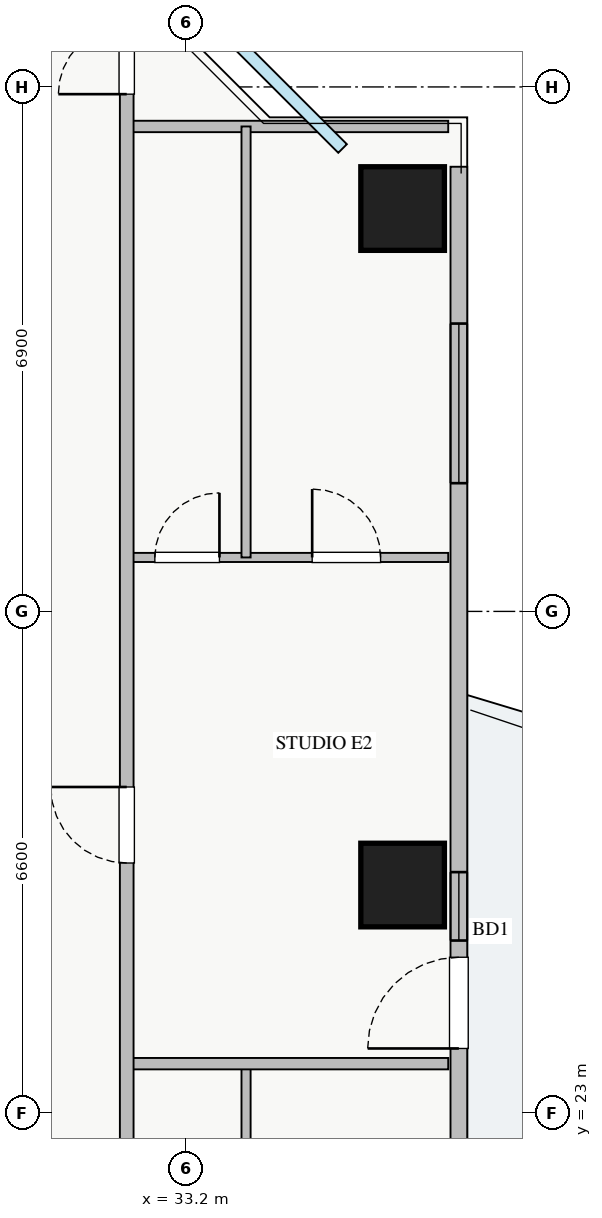
"""IFC4 building model, lengths in metres.
Left out: names, types, materials, properties, quantities, classifications, styles, units other than length and angle.
Written with IfcOpenShell. Run it as: python <this file> out.ifc"""

import sys

from ifc_helpers import new_model, si_unit, direction, frame, frame_2d, origin, origin_2d, place, context, subcontext, project, spatial, rectangle, extrude, source, transform, mapped, element, fill, save


model = new_model("IFC4")
c1 = context("Model", 3, precision=1e-05, world=origin(), true_north=direction((0.0, 1.0)))
c2 = subcontext(c1, "Body", "Model", "MODEL_VIEW")
j1 = project(units=[si_unit("LENGTHUNIT", "METRE"), si_unit("PLANEANGLEUNIT", "RADIAN")], contexts=[c1])
p1 = place(None, origin())
s1 = spatial("IfcSite", under=j1, at=p1, CompositionType="ELEMENT")
p2 = place(p1, origin())
s2 = spatial("IfcBuilding", under=s1, at=p2, CompositionType="ELEMENT")
p3 = place(p2, frame((0.0, 0.0, 116.5)))
s3 = spatial("IfcBuildingStorey", under=s2, at=p3, CompositionType="ELEMENT", Elevation=116.5)
m1 = source(origin(), c2, "Body", "SweptSolid", [
    extrude(rectangle(XDim=1.1, YDim=1.1, at=origin_2d()), origin(), (0.0, 0.0, 1.0), 3.25),
])
for number, where, z_axis, x_axis in (
    (1, (36.05, 26.0, 0.0), (0.0, 0.0, 1.0), (1.0, 0.0, 0.0)),
    (2, (36.05, 34.9, 0.0), (0.0, 0.0, 1.0), (1.0, 0.0, 0.0)),
):
    element("IfcColumn", number, at=place(p3, frame(where, z_axis=z_axis, x_axis=x_axis)), inside=s3, PredefinedType="COLUMN", context=c2, shape_type="MappedRepresentation", body=[
        mapped(m1, transform((0.0, 0.0, 0.0), x_axis=(1.0, 0.0, 0.0), y_axis=(0.0, 1.0, 0.0), z_axis=(0.0, 0.0, 1.0), scale=1.0)),
    ])
p4 = place(p3, frame((36.79, 10.55, 0.0), z_axis=(0.0, 0.0, 1.0), x_axis=(0.0, 1.0, 0.0)))
e3 = element("IfcWall", 3, at=p4, inside=s3, PredefinedType="STANDARD", context=c2, shape_type="SweptSolid", body=[
    extrude(rectangle(XDim=24.9, YDim=0.22, at=frame_2d((12.45, 0.0))), origin(), (0.0, 0.0, 1.0), 2.61),
])
p5 = place(p4, frame((13.3, 0.0, 0.0)))
e4 = element("IfcOpeningElement", 4, at=p5, cuts=e3, PredefinedType="OPENING", context=c2, shape_type="SweptSolid", body=[
    extrude(rectangle(XDim=1.2, YDim=2.1, at=frame_2d((0.6, 1.05))), frame((0.0, 0.12, 0.0), z_axis=(0.0, -1.0, 0.0), x_axis=(1.0, 0.0, 0.0)), (0.0, 0.0, 1.0), 0.24),
])
p6 = place(p4, frame((1.912, 0.0, 0.9)))
e5 = element("IfcOpeningElement", 5, at=p6, cuts=e3, PredefinedType="OPENING", context=c2, shape_type="SweptSolid", body=[
    extrude(rectangle(XDim=2.4, YDim=1.48, at=frame_2d((1.2, 0.74))), frame((0.0, 0.12, 0.0), z_axis=(0.0, -1.0, 0.0), x_axis=(1.0, 0.0, 0.0)), (0.0, 0.0, 1.0), 0.24),
])
p7 = place(p4, frame((20.737, 0.0, 0.9)))
e6 = element("IfcOpeningElement", 6, at=p7, cuts=e3, PredefinedType="OPENING", context=c2, shape_type="SweptSolid", body=[
    extrude(rectangle(XDim=2.1, YDim=1.48, at=frame_2d((1.05, 0.74))), frame((0.0, 0.12, 0.0), z_axis=(0.0, -1.0, 0.0), x_axis=(1.0, 0.0, 0.0)), (0.0, 0.0, 1.0), 0.24),
])
p8 = place(p4, frame((14.72, 0.0, 0.9)))
e7 = element("IfcOpeningElement", 7, at=p8, cuts=e3, PredefinedType="OPENING", context=c2, shape_type="SweptSolid", body=[
    extrude(rectangle(XDim=0.9, YDim=1.2, at=frame_2d((0.45, 0.6))), frame((0.0, 0.12, 0.0), z_axis=(0.0, -1.0, 0.0), x_axis=(1.0, 0.0, 0.0)), (0.0, 0.0, 1.0), 0.24),
])
p9 = place(p3, frame((32.42, 35.98, 0.0), z_axis=(0.0, 0.0, 1.0), x_axis=(1.0, 0.0, 0.0)))
e8 = element("IfcWall", 8, at=p9, inside=s3, PredefinedType="PARTITIONING", context=c2, shape_type="SweptSolid", body=[
    extrude(rectangle(XDim=4.23, YDim=0.15, at=frame_2d((2.115, 0.0))), origin(), (0.0, 0.0, 1.0), 3.07),
])
p10 = place(p3, frame((33.99, 17.38, 0.0), z_axis=(0.0, 0.0, 1.0), x_axis=(0.0, 1.0, 0.0)))
e9 = element("IfcWall", 9, at=p10, inside=s3, PredefinedType="PLUMBINGWALL", context=c2, shape_type="SweptSolid", body=[
    extrude(rectangle(XDim=6.27, YDim=0.12, at=frame_2d((3.135, 0.0))), origin(), (0.0, 0.0, 1.0), 3.07),
])
p11 = place(p3, frame((32.42, 30.31, 0.0), z_axis=(0.0, 0.0, 1.0), x_axis=(1.0, 0.0, 0.0)))
e10 = element("IfcWall", 10, at=p11, inside=s3, PredefinedType="PLUMBINGWALL", context=c2, shape_type="SweptSolid", body=[
    extrude(rectangle(XDim=4.23, YDim=0.12, at=frame_2d((2.115, 0.0))), origin(), (0.0, 0.0, 1.0), 3.07),
])
p12 = place(p11, frame((0.37, 0.0, 0.0)))
e11 = element("IfcOpeningElement", 11, at=p12, cuts=e10, PredefinedType="OPENING", context=c2, shape_type="SweptSolid", body=[
    extrude(rectangle(XDim=0.85, YDim=2.05, at=frame_2d((0.425, 1.025))), frame((0.0, 0.07, 0.0), z_axis=(0.0, -1.0, 0.0), x_axis=(1.0, 0.0, 0.0)), (0.0, 0.0, 1.0), 0.14),
])
p13 = place(p11, frame((2.44, 0.0, 0.0)))
e12 = element("IfcOpeningElement", 12, at=p13, cuts=e10, PredefinedType="OPENING", context=c2, shape_type="SweptSolid", body=[
    extrude(rectangle(XDim=0.9, YDim=2.05, at=frame_2d((0.45, 1.025))), frame((0.0, 0.07, 0.0), z_axis=(0.0, -1.0, 0.0), x_axis=(1.0, 0.0, 0.0)), (0.0, 0.0, 1.0), 0.14),
])
p14 = place(p3, frame((33.99, 30.31, 0.0), z_axis=(0.0, 0.0, 1.0), x_axis=(0.0, 1.0, 0.0)))
e13 = element("IfcWall", 13, at=p14, inside=s3, PredefinedType="PLUMBINGWALL", context=c2, shape_type="SweptSolid", body=[
    extrude(rectangle(XDim=5.67, YDim=0.12, at=frame_2d((2.835, 0.0))), origin(), (0.0, 0.0, 1.0), 3.07),
])
p15 = place(p3, frame((32.42, 23.65, 0.0), z_axis=(0.0, 0.0, 1.0), x_axis=(1.0, 0.0, 0.0)))
e14 = element("IfcWall", 14, at=p15, inside=s3, PredefinedType="PARTITIONING", context=c2, shape_type="SweptSolid", body=[
    extrude(rectangle(XDim=4.23, YDim=0.15, at=frame_2d((2.115, 0.0))), origin(), (0.0, 0.0, 1.0), 3.07),
])
p16 = place(p3, frame((32.42, 8.25, 0.0), z_axis=(0.0, 0.0, 1.0), x_axis=(0.0, 1.0, 0.0)))
e15 = element("IfcWall", 15, at=p16, inside=s3, PredefinedType="PARTITIONING", context=c2, shape_type="SweptSolid", body=[
    extrude(rectangle(XDim=29.5, YDim=0.18, at=frame_2d((14.75, 0.0))), origin(), (0.0, 0.0, 1.0), 3.07),
])
p17 = place(p16, frame((28.155, 0.0, 0.0)))
e16 = element("IfcOpeningElement", 16, at=p17, cuts=e15, PredefinedType="OPENING", context=c2, shape_type="SweptSolid", body=[
    extrude(rectangle(XDim=0.9, YDim=2.05, at=frame_2d((0.45, 1.025))), frame((0.0, 0.1, 0.0), z_axis=(0.0, -1.0, 0.0), x_axis=(1.0, 0.0, 0.0)), (0.0, 0.0, 1.0), 0.2),
])
p18 = place(p16, frame((0.445, 0.0, 0.0)))
e17 = element("IfcOpeningElement", 17, at=p18, cuts=e15, PredefinedType="OPENING", context=c2, shape_type="SweptSolid", body=[
    extrude(rectangle(XDim=0.9, YDim=2.05, at=frame_2d((0.45, 1.025))), frame((0.0, 0.1, 0.0), z_axis=(0.0, -1.0, 0.0), x_axis=(1.0, 0.0, 0.0)), (0.0, 0.0, 1.0), 0.2),
])
p19 = place(p16, frame((4.76, 0.0, 0.0)))
e18 = element("IfcOpeningElement", 18, at=p19, cuts=e15, PredefinedType="OPENING", context=c2, shape_type="SweptSolid", body=[
    extrude(rectangle(XDim=1.0, YDim=2.05, at=frame_2d((0.5, 1.025))), frame((0.0, 0.1, 0.0), z_axis=(0.0, -1.0, 0.0), x_axis=(1.0, 0.0, 0.0)), (0.0, 0.0, 1.0), 0.2),
])
p20 = place(p16, frame((18.04, 0.0, 0.0)))
e19 = element("IfcOpeningElement", 19, at=p20, cuts=e15, PredefinedType="OPENING", context=c2, shape_type="SweptSolid", body=[
    extrude(rectangle(XDim=1.0, YDim=2.05, at=frame_2d((0.5, 1.025))), frame((0.0, 0.1, 0.0), z_axis=(0.0, -1.0, 0.0), x_axis=(1.0, 0.0, 0.0)), (0.0, 0.0, 1.0), 0.2),
])
m2 = source(origin(), c2, "Body", "SweptSolid", [
    extrude(rectangle(XDim=1.2, YDim=2.1, at=frame_2d((0.6, 1.05))), frame((0.0, 0.025, 0.0), z_axis=(0.0, -1.0, 0.0), x_axis=(1.0, 0.0, 0.0)), (0.0, 0.0, 1.0), 0.05),
])
p21 = place(p5, origin())
e20 = element("IfcDoor", 20, at=p21, inside=s3, OperationType="SINGLE_SWING_LEFT", PredefinedType="DOOR", context=c2, shape_type="MappedRepresentation", body=[
    mapped(m2, transform((0.0, 0.0, 0.0), x_axis=(1.0, 0.0, 0.0), y_axis=(0.0, 1.0, 0.0), z_axis=(0.0, 0.0, 1.0), scale=1.0)),
])
fill(e4, e20)
m3 = source(origin(), c2, "Body", "SweptSolid", [
    extrude(rectangle(XDim=2.1, YDim=1.48, at=frame_2d((1.05, 0.74))), frame((0.0, 0.03, 0.0), z_axis=(0.0, -1.0, 0.0), x_axis=(1.0, 0.0, 0.0)), (0.0, 0.0, 1.0), 0.06),
])
p22 = place(p7, origin())
e21 = element("IfcWindow", 21, at=p22, inside=s3, PartitioningType="TRIPLE_PANEL_VERTICAL", PredefinedType="WINDOW", context=c2, shape_type="MappedRepresentation", body=[
    mapped(m3, transform((0.0, 0.0, 0.0), x_axis=(1.0, 0.0, 0.0), y_axis=(0.0, 1.0, 0.0), z_axis=(0.0, 0.0, 1.0), scale=1.0)),
])
fill(e6, e21)
m4 = source(origin(), c2, "Body", "SweptSolid", [
    extrude(rectangle(XDim=0.85, YDim=2.05, at=frame_2d((0.425, 1.025))), frame((0.0, 0.025, 0.0), z_axis=(0.0, -1.0, 0.0), x_axis=(1.0, 0.0, 0.0)), (0.0, 0.0, 1.0), 0.05),
])
p23 = place(p12, origin())
e22 = element("IfcDoor", 22, at=p23, inside=s3, OperationType="SINGLE_SWING_RIGHT", PredefinedType="DOOR", context=c2, shape_type="MappedRepresentation", body=[
    mapped(m4, transform((0.0, 0.0, 0.0), x_axis=(1.0, 0.0, 0.0), y_axis=(0.0, 1.0, 0.0), z_axis=(0.0, 0.0, 1.0), scale=1.0)),
])
fill(e11, e22)
m5 = source(origin(), c2, "Body", "SweptSolid", [
    extrude(rectangle(XDim=0.9, YDim=2.05, at=frame_2d((0.45, 1.025))), frame((0.0, 0.025, 0.0), z_axis=(0.0, -1.0, 0.0), x_axis=(1.0, 0.0, 0.0)), (0.0, 0.0, 1.0), 0.05),
])
p24 = place(p13, origin())
e23 = element("IfcDoor", 23, at=p24, inside=s3, OperationType="SINGLE_SWING_LEFT", PredefinedType="DOOR", context=c2, shape_type="MappedRepresentation", body=[
    mapped(m5, transform((0.0, 0.0, 0.0), x_axis=(1.0, 0.0, 0.0), y_axis=(0.0, 1.0, 0.0), z_axis=(0.0, 0.0, 1.0), scale=1.0)),
])
fill(e12, e23)
p25 = place(p17, origin())
e24 = element("IfcDoor", 24, at=p25, inside=s3, OperationType="SINGLE_SWING_LEFT", PredefinedType="DOOR", context=c2, shape_type="MappedRepresentation", body=[
    mapped(m5, transform((0.0, 0.0, 0.0), x_axis=(1.0, 0.0, 0.0), y_axis=(0.0, 1.0, 0.0), z_axis=(0.0, 0.0, 1.0), scale=1.0)),
])
fill(e16, e24)
m6 = source(origin(), c2, "Body", "SweptSolid", [
    extrude(rectangle(XDim=1.0, YDim=2.05, at=frame_2d((0.5, 1.025))), frame((0.0, 0.025, 0.0), z_axis=(0.0, -1.0, 0.0), x_axis=(1.0, 0.0, 0.0)), (0.0, 0.0, 1.0), 0.05),
])
p26 = place(p20, origin())
e25 = element("IfcDoor", 25, at=p26, inside=s3, OperationType="SINGLE_SWING_RIGHT", PredefinedType="DOOR", context=c2, shape_type="MappedRepresentation", body=[
    mapped(m6, transform((0.0, 0.0, 0.0), x_axis=(1.0, 0.0, 0.0), y_axis=(0.0, 1.0, 0.0), z_axis=(0.0, 0.0, 1.0), scale=1.0)),
])
fill(e19, e25)
m7 = source(origin(), c2, "Body", "SweptSolid", [
    extrude(rectangle(XDim=0.9, YDim=1.2, at=frame_2d((0.45, 0.6))), frame((0.0, 0.03, 0.0), z_axis=(0.0, -1.0, 0.0), x_axis=(1.0, 0.0, 0.0)), (0.0, 0.0, 1.0), 0.06),
])
p27 = place(p8, origin())
e26 = element("IfcWindow", 26, at=p27, inside=s3, PartitioningType="SINGLE_PANEL", PredefinedType="WINDOW", context=c2, shape_type="MappedRepresentation", body=[
    mapped(m7, transform((0.0, 0.0, 0.0), x_axis=(1.0, 0.0, 0.0), y_axis=(0.0, 1.0, 0.0), z_axis=(0.0, 0.0, 1.0), scale=1.0)),
])
fill(e7, e26)
save(model, sys.argv[1])
